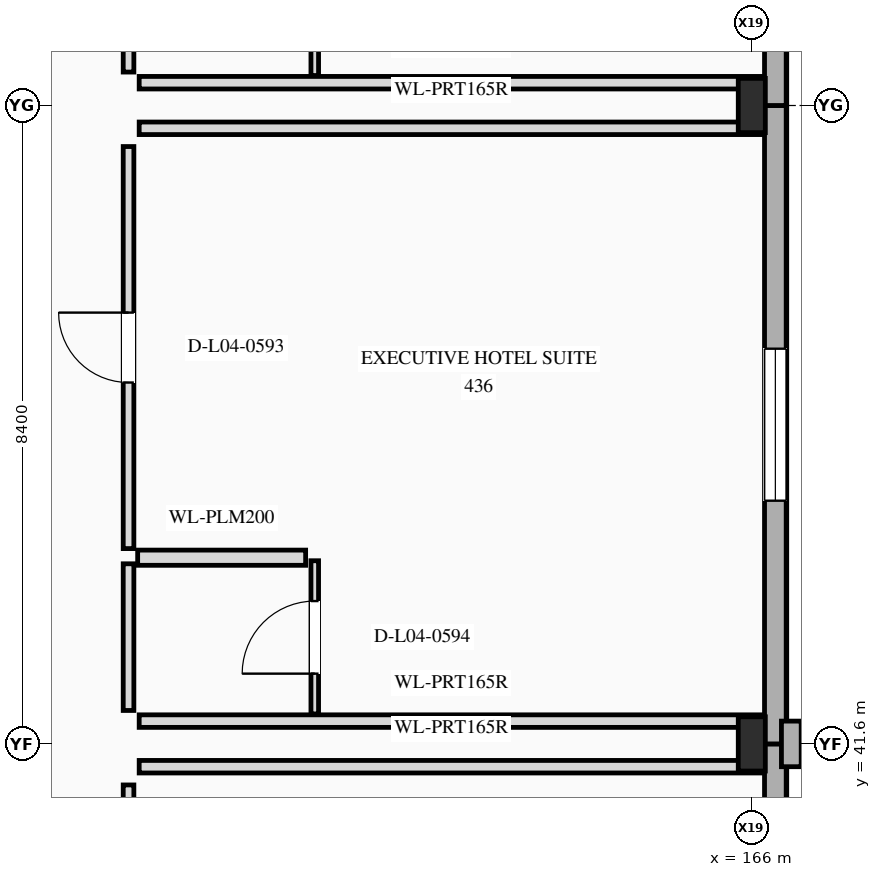
"""IFC4 building model, lengths in metres.
Left out: names, types, materials, properties, quantities, classifications, styles, units other than length and angle.
Written with IfcOpenShell. Run it as: python <this file> out.ifc"""

import sys

from ifc_helpers import new_model, si_unit, direction, frame, frame_2d, origin, origin_2d, place, context, subcontext, project, spatial, rectangle, i_section, extrude, element, fill, save


model = new_model("IFC4")
c1 = context("Model", 3, precision=1e-05, world=origin(), true_north=direction((0.0, 1.0)))
c2 = subcontext(c1, "Body", "Model", "MODEL_VIEW")
j1 = project(units=[si_unit("LENGTHUNIT", "METRE"), si_unit("PLANEANGLEUNIT", "RADIAN")], contexts=[c1])
p1 = place(None, origin())
s1 = spatial("IfcSite", under=j1, at=p1, CompositionType="ELEMENT")
p2 = place(p1, origin())
s2 = spatial("IfcBuilding", under=s1, at=p2, CompositionType="ELEMENT")
p3 = place(p2, frame((0.0, 0.0, 19.5)))
s3 = spatial("IfcBuildingStorey", under=s2, at=p3, CompositionType="ELEMENT", Elevation=19.5)
for number, where, z_axis, x_axis in (
    (1, (166.0, 41.6, 0.0), (0.0, 0.0, 1.0), (1.0, 0.0, 0.0)),
    (2, (166.0, 50.0, 0.0), (0.0, 0.0, 1.0), (1.0, 0.0, 0.0)),
):
    element("IfcColumn", number, at=place(p3, frame(where, z_axis=z_axis, x_axis=x_axis)), inside=s3, PredefinedType="COLUMN", context=c2, shape_type="SweptSolid", body=[
        extrude(i_section(OverallWidth=0.356, OverallDepth=0.714, WebThickness=0.019, FlangeThickness=0.034, at=origin_2d()), origin(), (0.0, 0.0, 1.0), 3.9),
    ])
p4 = place(p3, frame((166.31, 39.46, 0.0), z_axis=(0.0, 0.0, 1.0), x_axis=(0.0, 1.0, 0.0)))
e3 = element("IfcWall", 3, at=p4, inside=s3, PredefinedType="STANDARD", context=c2, shape_type="SweptSolid", body=[
    extrude(rectangle(XDim=2.14, YDim=0.285, at=frame_2d((1.07, 0.0))), origin(), (0.0, 0.0, 1.0), 3.9),
])
p5 = place(p3, frame((166.31, 41.6, 0.0), z_axis=(0.0, 0.0, 1.0), x_axis=(0.0, 1.0, 0.0)))
e4 = element("IfcWall", 4, at=p5, inside=s3, PredefinedType="STANDARD", context=c2, shape_type="SweptSolid", body=[
    extrude(rectangle(XDim=8.4, YDim=0.285, at=frame_2d((4.2, 0.0))), origin(), (0.0, 0.0, 1.0), 3.9),
])
p6 = place(p5, frame((3.2, 0.0, 0.85)))
e5 = element("IfcOpeningElement", 5, at=p6, cuts=e4, PredefinedType="OPENING", context=c2, shape_type="SweptSolid", body=[
    extrude(rectangle(XDim=2.0, YDim=1.65, at=frame_2d((1.0, 0.825))), frame((0.0, 0.152, 0.0), z_axis=(0.0, -1.0, 0.0), x_axis=(1.0, 0.0, 0.0)), (0.0, 0.0, 1.0), 0.305),
])
p7 = place(p3, frame((166.52, 41.3, 0.0), z_axis=(0.0, 0.0, 1.0), x_axis=(0.0, 1.0, 0.0)))
e6 = element("IfcWall", 6, at=p7, inside=s3, PredefinedType="ELEMENTEDWALL", context=c2, shape_type="SweptSolid", body=[
    extrude(rectangle(XDim=0.6, YDim=0.26, at=frame_2d((0.3, 0.0))), origin(), (0.0, 0.0, 1.0), 3.9),
])
p8 = place(p3, frame((166.31, 50.0, 0.0), z_axis=(0.0, 0.0, 1.0), x_axis=(0.0, 1.0, 0.0)))
e7 = element("IfcWall", 7, at=p8, inside=s3, PredefinedType="STANDARD", context=c2, shape_type="SweptSolid", body=[
    extrude(rectangle(XDim=1.34, YDim=0.285, at=frame_2d((0.67, 0.0))), origin(), (0.0, 0.0, 1.0), 3.9),
])
p9 = place(p3, frame((157.8, 35.77, 0.0), z_axis=(0.0, 0.0, 1.0), x_axis=(0.0, 1.0, 0.0)))
e8 = element("IfcWall", 8, at=p9, inside=s3, PredefinedType="PARTITIONING", context=c2, shape_type="SweptSolid", body=[
    extrude(rectangle(XDim=5.29, YDim=0.14, at=frame_2d((2.645, 0.0))), origin(), (0.0, 0.0, 1.0), 3.585),
])
p10 = place(p9, frame((2.125, 0.0, 0.0)))
e9 = element("IfcOpeningElement", 9, at=p10, cuts=e8, PredefinedType="OPENING", context=c2, shape_type="SweptSolid", body=[
    extrude(rectangle(XDim=1.04, YDim=2.25, at=frame_2d((0.52, 1.125))), frame((0.0, 0.08, 0.0), z_axis=(0.0, -1.0, 0.0), x_axis=(1.0, 0.0, 0.0)), (0.0, 0.0, 1.0), 0.16),
])
p11 = place(p3, frame((157.94, 41.3, 0.0), z_axis=(0.0, 0.0, 1.0), x_axis=(1.0, 0.0, 0.0)))
e10 = element("IfcWall", 10, at=p11, inside=s3, PredefinedType="PARTITIONING", context=c2, shape_type="SweptSolid", body=[
    extrude(rectangle(XDim=8.213, YDim=0.165, at=frame_2d((4.106, 0.0))), origin(), (0.0, 0.0, 1.0), 2.975),
])
p12 = place(p3, frame((157.8, 42.04, 0.0), z_axis=(0.0, 0.0, 1.0), x_axis=(0.0, 1.0, 0.0)))
e11 = element("IfcWall", 11, at=p12, inside=s3, PredefinedType="PARTITIONING", context=c2, shape_type="SweptSolid", body=[
    extrude(rectangle(XDim=1.93, YDim=0.14, at=frame_2d((0.965, 0.0))), origin(), (0.0, 0.0, 1.0), 3.138),
])
p13 = place(p3, frame((157.8, 44.17, 0.0), z_axis=(0.0, 0.0, 1.0), x_axis=(0.0, 1.0, 0.0)))
e12 = element("IfcWall", 12, at=p13, inside=s3, PredefinedType="PARTITIONING", context=c2, shape_type="SweptSolid", body=[
    extrude(rectangle(XDim=5.29, YDim=0.14, at=frame_2d((2.645, 0.0))), origin(), (0.0, 0.0, 1.0), 3.138),
])
p14 = place(p13, frame((2.185, 0.0, 0.0)))
e13 = element("IfcOpeningElement", 13, at=p14, cuts=e12, PredefinedType="OPENING", context=c2, shape_type="SweptSolid", body=[
    extrude(rectangle(XDim=0.92, YDim=2.3, at=frame_2d((0.46, 1.15))), frame((0.0, 0.08, 0.0), z_axis=(0.0, -1.0, 0.0), x_axis=(1.0, 0.0, 0.0)), (0.0, 0.0, 1.0), 0.16),
])
for number, where, z_axis, x_axis in (
    (14, (157.94, 41.9, 0.0), (0.0, 0.0, 1.0), (1.0, 0.0, 0.0)),
    (15, (157.94, 49.7, 0.0), (0.0, 0.0, 1.0), (1.0, 0.0, 0.0)),
):
    element("IfcWall", number, at=place(p3, frame(where, z_axis=z_axis, x_axis=x_axis)), inside=s3, PredefinedType="PARTITIONING", context=c2, shape_type="SweptSolid", body=[
        extrude(rectangle(XDim=8.213, YDim=0.165, at=frame_2d((4.106, 0.0))), origin(), (0.0, 0.0, 1.0), 2.975),
    ])
p15 = place(p3, frame((157.92, 44.05, 0.0), z_axis=(0.0, 0.0, 1.0), x_axis=(1.0, 0.0, 0.0)))
e16 = element("IfcWall", 16, at=p15, inside=s3, PredefinedType="PLUMBINGWALL", context=c2, shape_type="SweptSolid", body=[
    extrude(rectangle(XDim=2.21, YDim=0.2, at=frame_2d((1.105, 0.0))), origin(), (0.0, 0.0, 1.0), 3.585),
])
p16 = place(p3, frame((160.25, 41.994, 0.0), z_axis=(0.0, 0.0, 1.0), x_axis=(0.0, 1.0, 0.0)))
e17 = element("IfcWall", 17, at=p16, inside=s3, PredefinedType="PARTITIONING", context=c2, shape_type="SweptSolid", body=[
    extrude(rectangle(XDim=2.016, YDim=0.1, at=frame_2d((1.008, 0.0))), origin(), (0.0, 0.0, 1.0), 3.138),
])
p17 = place(p16, frame((0.53, 0.0, 0.0)))
e18 = element("IfcOpeningElement", 18, at=p17, cuts=e17, PredefinedType="OPENING", context=c2, shape_type="SweptSolid", body=[
    extrude(rectangle(XDim=0.955, YDim=2.22, at=frame_2d((0.478, 1.11))), frame((0.0, 0.06, 0.0), z_axis=(0.0, -1.0, 0.0), x_axis=(1.0, 0.0, 0.0)), (0.0, 0.0, 1.0), 0.12),
])
p18 = place(p3, frame((157.8, 50.44, 0.0), z_axis=(0.0, 0.0, 1.0), x_axis=(0.0, 1.0, 0.0)))
e19 = element("IfcWall", 19, at=p18, inside=s3, PredefinedType="PARTITIONING", context=c2, shape_type="SweptSolid", body=[
    extrude(rectangle(XDim=1.93, YDim=0.14, at=frame_2d((0.965, 0.0))), origin(), (0.0, 0.0, 1.0), 3.585),
])
p19 = place(p3, frame((157.94, 50.3, 0.0), z_axis=(0.0, 0.0, 1.0), x_axis=(1.0, 0.0, 0.0)))
e20 = element("IfcWall", 20, at=p19, inside=s3, PredefinedType="PARTITIONING", context=c2, shape_type="SweptSolid", body=[
    extrude(rectangle(XDim=8.213, YDim=0.165, at=frame_2d((4.106, 0.0))), origin(), (0.0, 0.0, 1.0), 2.975),
])
p20 = place(p3, frame((160.25, 50.395, 0.0), z_axis=(0.0, 0.0, 1.0), x_axis=(0.0, 1.0, 0.0)))
e21 = element("IfcWall", 21, at=p20, inside=s3, PredefinedType="PARTITIONING", context=c2, shape_type="SweptSolid", body=[
    extrude(rectangle(XDim=2.015, YDim=0.1, at=frame_2d((1.008, 0.0))), origin(), (0.0, 0.0, 1.0), 3.585),
])
p21 = place(p20, frame((0.568, 0.0, 0.0)))
e22 = element("IfcOpeningElement", 22, at=p21, cuts=e21, PredefinedType="OPENING", context=c2, shape_type="SweptSolid", body=[
    extrude(rectangle(XDim=0.88, YDim=2.1, at=frame_2d((0.44, 1.05))), frame((0.0, 0.06, 0.0), z_axis=(0.0, -1.0, 0.0), x_axis=(1.0, 0.0, 0.0)), (0.0, 0.0, 1.0), 0.12),
])
p22 = place(p6, origin())
e23 = element("IfcWindow", 23, at=p22, inside=s3, PartitioningType="SINGLE_PANEL", PredefinedType="WINDOW", context=c2, shape_type="SweptSolid", body=[
    extrude(rectangle(XDim=2.0, YDim=1.65, at=frame_2d((1.0, 0.825))), frame((0.0, 0.03, 0.0), z_axis=(0.0, -1.0, 0.0), x_axis=(1.0, 0.0, 0.0)), (0.0, 0.0, 1.0), 0.06),
])
fill(e5, e23)
p23 = place(p14, origin())
e24 = element("IfcDoor", 24, at=p23, inside=s3, OperationType="SINGLE_SWING_RIGHT", PredefinedType="DOOR", context=c2, shape_type="SweptSolid", body=[
    extrude(rectangle(XDim=0.92, YDim=2.3, at=frame_2d((0.46, 1.15))), frame((0.0, 0.025, 0.0), z_axis=(0.0, -1.0, 0.0), x_axis=(1.0, 0.0, 0.0)), (0.0, 0.0, 1.0), 0.05),
])
fill(e13, e24)
p24 = place(p17, origin())
e25 = element("IfcDoor", 25, at=p24, inside=s3, OperationType="SINGLE_SWING_LEFT", PredefinedType="DOOR", context=c2, shape_type="SweptSolid", body=[
    extrude(rectangle(XDim=0.955, YDim=2.22, at=frame_2d((0.478, 1.11))), frame((0.0, 0.025, 0.0), z_axis=(0.0, -1.0, 0.0), x_axis=(1.0, 0.0, 0.0)), (0.0, 0.0, 1.0), 0.05),
])
fill(e18, e25)
save(model, sys.argv[1])
